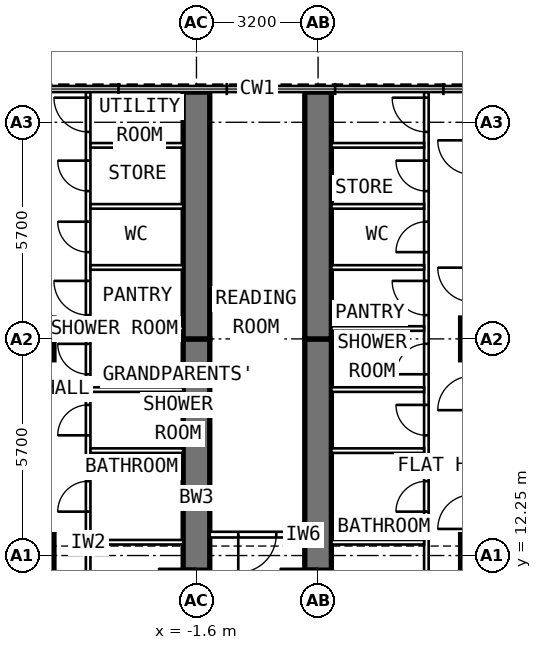
"""IFC4 building model, lengths in metres.
Left out: names, types, materials, properties, quantities, classifications, styles, units other than length and angle.
Written with IfcOpenShell. Run it as: python <this file> out.ifc"""

import sys

from ifc_helpers import new_model, si_unit, direction, frame, frame_2d, origin, origin_2d, place, context, subcontext, project, spatial, rectangle, extrude, element, fill, save


model = new_model("IFC4")
c1 = context("Model", 3, precision=1e-05, world=origin(), true_north=direction((0.0, 1.0)))
c2 = subcontext(c1, "Body", "Model", "MODEL_VIEW")
j1 = project(units=[si_unit("LENGTHUNIT", "METRE"), si_unit("PLANEANGLEUNIT", "RADIAN")], contexts=[c1])
p1 = place(None, origin())
s1 = spatial("IfcSite", under=j1, at=p1, CompositionType="ELEMENT")
p2 = place(p1, origin())
s2 = spatial("IfcBuilding", under=s1, at=p2, CompositionType="ELEMENT")
p3 = place(p2, frame((0.0, 0.0, 256.8)))
s3 = spatial("IfcBuildingStorey", under=s2, at=p3, CompositionType="ELEMENT", Elevation=256.8)
for number, where, z_axis, x_axis in (
    (1, (-5.9, 12.25, 0.0), (0.0, 0.0, 1.0), (0.0, 1.0, 0.0)),
    (2, (-5.9, 17.95, 0.0), (0.0, 0.0, 1.0), (0.0, 1.0, 0.0)),
    (3, (5.9, 12.25, 0.0), (0.0, 0.0, 1.0), (0.0, 1.0, 0.0)),
    (4, (5.9, 17.95, 0.0), (0.0, 0.0, 1.0), (0.0, 1.0, 0.0)),
):
    element("IfcColumn", number, at=place(p3, frame(where, z_axis=z_axis, x_axis=x_axis)), inside=s3, PredefinedType="COLUMN", context=c2, shape_type="SweptSolid", body=[
        extrude(rectangle(XDim=1.1, YDim=1.1, at=origin_2d()), origin(), (0.0, 0.0, 1.0), 3.6),
    ])
p4 = place(p3, frame((-1.6, 9.6, 0.0), z_axis=(0.0, 0.0, 1.0), x_axis=(0.0, 1.0, 0.0)))
e5 = element("IfcWall", 5, at=p4, inside=s3, PredefinedType="SHEAR", context=c2, shape_type="SweptSolid", body=[
    extrude(rectangle(XDim=8.35, YDim=0.7, at=frame_2d((4.175, 0.0))), origin(), (0.0, 0.0, 1.0), 3.6),
])
p5 = place(p4, frame((1.3, 0.0, 0.0)))
e6 = element("IfcOpeningElement", 6, at=p5, cuts=e5, PredefinedType="OPENING", context=c2, shape_type="SweptSolid", body=[
    extrude(rectangle(XDim=1.0, YDim=2.1, at=frame_2d((0.5, 1.05))), frame((0.0, 0.362, 0.0), z_axis=(0.0, -1.0, 0.0), x_axis=(1.0, 0.0, 0.0)), (0.0, 0.0, 1.0), 0.724),
])
p6 = place(p3, frame((-1.6, 17.95, 0.0), z_axis=(0.0, 0.0, 1.0), x_axis=(0.0, 1.0, 0.0)))
e7 = element("IfcWall", 7, at=p6, inside=s3, PredefinedType="SHEAR", context=c2, shape_type="SweptSolid", body=[
    extrude(rectangle(XDim=6.495, YDim=0.7, at=frame_2d((3.248, 0.0))), origin(), (0.0, 0.0, 1.0), 3.6),
])
p7 = place(p3, frame((1.6, 9.6, 0.0), z_axis=(0.0, 0.0, 1.0), x_axis=(0.0, 1.0, 0.0)))
e8 = element("IfcWall", 8, at=p7, inside=s3, PredefinedType="SHEAR", context=c2, shape_type="SweptSolid", body=[
    extrude(rectangle(XDim=8.35, YDim=0.7, at=frame_2d((4.175, 0.0))), origin(), (0.0, 0.0, 1.0), 3.6),
])
p8 = place(p7, frame((1.3, 0.0, 0.0)))
e9 = element("IfcOpeningElement", 9, at=p8, cuts=e8, PredefinedType="OPENING", context=c2, shape_type="SweptSolid", body=[
    extrude(rectangle(XDim=1.0, YDim=2.1, at=frame_2d((0.5, 1.05))), frame((0.0, 0.362, 0.0), z_axis=(0.0, -1.0, 0.0), x_axis=(1.0, 0.0, 0.0)), (0.0, 0.0, 1.0), 0.724),
])
p9 = place(p3, frame((1.6, 17.95, 0.0), z_axis=(0.0, 0.0, 1.0), x_axis=(0.0, 1.0, 0.0)))
e10 = element("IfcWall", 10, at=p9, inside=s3, PredefinedType="SHEAR", context=c2, shape_type="SweptSolid", body=[
    extrude(rectangle(XDim=6.495, YDim=0.7, at=frame_2d((3.248, 0.0))), origin(), (0.0, 0.0, 1.0), 3.6),
])
p10 = place(p3, frame((-4.45, 9.9, 0.0), z_axis=(0.0, 0.0, 1.0), x_axis=(0.0, 1.0, 0.0)))
e11 = element("IfcWall", 11, at=p10, inside=s3, PredefinedType="PARTITIONING", context=c2, shape_type="SweptSolid", body=[
    extrude(rectangle(XDim=14.545, YDim=0.12, at=frame_2d((7.272, 0.0))), origin(), (0.0, 0.0, 1.0), 3.3),
])
p11 = place(p10, frame((0.95, 0.0, 0.0)))
e12 = element("IfcOpeningElement", 12, at=p11, cuts=e11, PredefinedType="OPENING", context=c2, shape_type="SweptSolid", body=[
    extrude(rectangle(XDim=0.9, YDim=2.1, at=frame_2d((0.45, 1.05))), frame((0.0, 0.072, 0.0), z_axis=(0.0, -1.0, 0.0), x_axis=(1.0, 0.0, 0.0)), (0.0, 0.0, 1.0), 0.144),
])
p12 = place(p10, frame((3.505, 0.0, 0.0)))
e13 = element("IfcOpeningElement", 13, at=p12, cuts=e11, PredefinedType="OPENING", context=c2, shape_type="SweptSolid", body=[
    extrude(rectangle(XDim=0.8, YDim=2.1, at=frame_2d((0.4, 1.05))), frame((0.0, 0.072, 0.0), z_axis=(0.0, -1.0, 0.0), x_axis=(1.0, 0.0, 0.0)), (0.0, 0.0, 1.0), 0.144),
])
p13 = place(p10, frame((5.513, 0.0, 0.0)))
e14 = element("IfcOpeningElement", 14, at=p13, cuts=e11, PredefinedType="OPENING", context=c2, shape_type="SweptSolid", body=[
    extrude(rectangle(XDim=0.8, YDim=2.1, at=frame_2d((0.4, 1.05))), frame((0.0, 0.072, 0.0), z_axis=(0.0, -1.0, 0.0), x_axis=(1.0, 0.0, 0.0)), (0.0, 0.0, 1.0), 0.144),
])
p14 = place(p10, frame((7.12, 0.0, 0.0)))
e15 = element("IfcOpeningElement", 15, at=p14, cuts=e11, PredefinedType="OPENING", context=c2, shape_type="SweptSolid", body=[
    extrude(rectangle(XDim=0.8, YDim=2.1, at=frame_2d((0.4, 1.05))), frame((0.0, 0.072, 0.0), z_axis=(0.0, -1.0, 0.0), x_axis=(1.0, 0.0, 0.0)), (0.0, 0.0, 1.0), 0.144),
])
p15 = place(p10, frame((8.677, 0.0, 0.0)))
e16 = element("IfcOpeningElement", 16, at=p15, cuts=e11, PredefinedType="OPENING", context=c2, shape_type="SweptSolid", body=[
    extrude(rectangle(XDim=0.9, YDim=2.1, at=frame_2d((0.45, 1.05))), frame((0.0, 0.072, 0.0), z_axis=(0.0, -1.0, 0.0), x_axis=(1.0, 0.0, 0.0)), (0.0, 0.0, 1.0), 0.144),
])
p16 = place(p10, frame((10.333, 0.0, 0.0)))
e17 = element("IfcOpeningElement", 17, at=p16, cuts=e11, PredefinedType="OPENING", context=c2, shape_type="SweptSolid", body=[
    extrude(rectangle(XDim=0.8, YDim=2.1, at=frame_2d((0.4, 1.05))), frame((0.0, 0.072, 0.0), z_axis=(0.0, -1.0, 0.0), x_axis=(1.0, 0.0, 0.0)), (0.0, 0.0, 1.0), 0.144),
])
p17 = place(p10, frame((11.94, 0.0, 0.0)))
e18 = element("IfcOpeningElement", 18, at=p17, cuts=e11, PredefinedType="OPENING", context=c2, shape_type="SweptSolid", body=[
    extrude(rectangle(XDim=0.8, YDim=2.1, at=frame_2d((0.4, 1.05))), frame((0.0, 0.072, 0.0), z_axis=(0.0, -1.0, 0.0), x_axis=(1.0, 0.0, 0.0)), (0.0, 0.0, 1.0), 0.144),
])
p18 = place(p10, frame((13.497, 0.0, 0.0)))
e19 = element("IfcOpeningElement", 19, at=p18, cuts=e11, PredefinedType="OPENING", context=c2, shape_type="SweptSolid", body=[
    extrude(rectangle(XDim=0.9, YDim=2.1, at=frame_2d((0.45, 1.05))), frame((0.0, 0.072, 0.0), z_axis=(0.0, -1.0, 0.0), x_axis=(1.0, 0.0, 0.0)), (0.0, 0.0, 1.0), 0.144),
])
p19 = place(p3, frame((-1.95, 12.6, 0.0), z_axis=(0.0, 0.0, 1.0), x_axis=(-1.0, 0.0, 0.0)))
e20 = element("IfcWall", 20, at=p19, inside=s3, PredefinedType="PARTITIONING", context=c2, shape_type="SweptSolid", body=[
    extrude(rectangle(XDim=2.44, YDim=0.12, at=frame_2d((1.22, 0.0))), origin(), (0.0, 0.0, 1.0), 2.3),
])
for number, where, z_axis, x_axis in (
    (21, (-1.95, 15.01, 0.0), (0.0, 0.0, 1.0), (-1.0, 0.0, 0.0)),
    (22, (-1.95, 16.617, 0.0), (0.0, 0.0, 1.0), (-1.0, 0.0, 0.0)),
    (23, (-1.95, 18.223, 0.0), (0.0, 0.0, 1.0), (-1.0, 0.0, 0.0)),
    (24, (-1.95, 19.83, 0.0), (0.0, 0.0, 1.0), (-1.0, 0.0, 0.0)),
    (25, (-1.95, 21.437, 0.0), (0.0, 0.0, 1.0), (-1.0, 0.0, 0.0)),
    (26, (-1.95, 23.043, 0.0), (0.0, 0.0, 1.0), (-1.0, 0.0, 0.0)),
):
    element("IfcWall", number, at=place(p3, frame(where, z_axis=z_axis, x_axis=x_axis)), inside=s3, PredefinedType="PARTITIONING", context=c2, shape_type="SweptSolid", body=[
        extrude(rectangle(XDim=2.44, YDim=0.12, at=frame_2d((1.22, 0.0))), origin(), (0.0, 0.0, 1.0), 3.3),
    ])
p20 = place(p3, frame((4.45, 9.9, 0.0), z_axis=(0.0, 0.0, 1.0), x_axis=(0.0, 1.0, 0.0)))
e27 = element("IfcWall", 27, at=p20, inside=s3, PredefinedType="PARTITIONING", context=c2, shape_type="SweptSolid", body=[
    extrude(rectangle(XDim=14.545, YDim=0.12, at=frame_2d((7.272, 0.0))), origin(), (0.0, 0.0, 1.0), 3.3),
])
p21 = place(p20, frame((0.95, 0.0, 0.0)))
e28 = element("IfcOpeningElement", 28, at=p21, cuts=e27, PredefinedType="OPENING", context=c2, shape_type="SweptSolid", body=[
    extrude(rectangle(XDim=0.9, YDim=2.1, at=frame_2d((0.45, 1.05))), frame((0.0, 0.072, 0.0), z_axis=(0.0, -1.0, 0.0), x_axis=(1.0, 0.0, 0.0)), (0.0, 0.0, 1.0), 0.144),
])
p22 = place(p20, frame((3.505, 0.0, 0.0)))
e29 = element("IfcOpeningElement", 29, at=p22, cuts=e27, PredefinedType="OPENING", context=c2, shape_type="SweptSolid", body=[
    extrude(rectangle(XDim=0.8, YDim=2.1, at=frame_2d((0.4, 1.05))), frame((0.0, 0.072, 0.0), z_axis=(0.0, -1.0, 0.0), x_axis=(1.0, 0.0, 0.0)), (0.0, 0.0, 1.0), 0.144),
])
p23 = place(p20, frame((5.513, 0.0, 0.0)))
e30 = element("IfcOpeningElement", 30, at=p23, cuts=e27, PredefinedType="OPENING", context=c2, shape_type="SweptSolid", body=[
    extrude(rectangle(XDim=0.8, YDim=2.1, at=frame_2d((0.4, 1.05))), frame((0.0, 0.072, 0.0), z_axis=(0.0, -1.0, 0.0), x_axis=(1.0, 0.0, 0.0)), (0.0, 0.0, 1.0), 0.144),
])
p24 = place(p20, frame((7.12, 0.0, 0.0)))
e31 = element("IfcOpeningElement", 31, at=p24, cuts=e27, PredefinedType="OPENING", context=c2, shape_type="SweptSolid", body=[
    extrude(rectangle(XDim=0.8, YDim=2.1, at=frame_2d((0.4, 1.05))), frame((0.0, 0.072, 0.0), z_axis=(0.0, -1.0, 0.0), x_axis=(1.0, 0.0, 0.0)), (0.0, 0.0, 1.0), 0.144),
])
p25 = place(p20, frame((8.677, 0.0, 0.0)))
e32 = element("IfcOpeningElement", 32, at=p25, cuts=e27, PredefinedType="OPENING", context=c2, shape_type="SweptSolid", body=[
    extrude(rectangle(XDim=0.9, YDim=2.1, at=frame_2d((0.45, 1.05))), frame((0.0, 0.072, 0.0), z_axis=(0.0, -1.0, 0.0), x_axis=(1.0, 0.0, 0.0)), (0.0, 0.0, 1.0), 0.144),
])
p26 = place(p20, frame((10.333, 0.0, 0.0)))
e33 = element("IfcOpeningElement", 33, at=p26, cuts=e27, PredefinedType="OPENING", context=c2, shape_type="SweptSolid", body=[
    extrude(rectangle(XDim=0.8, YDim=2.1, at=frame_2d((0.4, 1.05))), frame((0.0, 0.072, 0.0), z_axis=(0.0, -1.0, 0.0), x_axis=(1.0, 0.0, 0.0)), (0.0, 0.0, 1.0), 0.144),
])
p27 = place(p20, frame((11.94, 0.0, 0.0)))
e34 = element("IfcOpeningElement", 34, at=p27, cuts=e27, PredefinedType="OPENING", context=c2, shape_type="SweptSolid", body=[
    extrude(rectangle(XDim=0.8, YDim=2.1, at=frame_2d((0.4, 1.05))), frame((0.0, 0.072, 0.0), z_axis=(0.0, -1.0, 0.0), x_axis=(1.0, 0.0, 0.0)), (0.0, 0.0, 1.0), 0.144),
])
p28 = place(p20, frame((13.497, 0.0, 0.0)))
e35 = element("IfcOpeningElement", 35, at=p28, cuts=e27, PredefinedType="OPENING", context=c2, shape_type="SweptSolid", body=[
    extrude(rectangle(XDim=0.9, YDim=2.1, at=frame_2d((0.45, 1.05))), frame((0.0, 0.072, 0.0), z_axis=(0.0, -1.0, 0.0), x_axis=(1.0, 0.0, 0.0)), (0.0, 0.0, 1.0), 0.144),
])
p29 = place(p3, frame((1.95, 12.6, 0.0), z_axis=(0.0, 0.0, 1.0), x_axis=(1.0, 0.0, 0.0)))
e36 = element("IfcWall", 36, at=p29, inside=s3, PredefinedType="PARTITIONING", context=c2, shape_type="SweptSolid", body=[
    extrude(rectangle(XDim=2.44, YDim=0.12, at=frame_2d((1.22, 0.0))), origin(), (0.0, 0.0, 1.0), 2.3),
])
for number, where, z_axis, x_axis in (
    (37, (1.95, 15.01, 0.0), (0.0, 0.0, 1.0), (1.0, 0.0, 0.0)),
    (38, (1.95, 16.617, 0.0), (0.0, 0.0, 1.0), (1.0, 0.0, 0.0)),
    (39, (1.95, 18.223, 0.0), (0.0, 0.0, 1.0), (1.0, 0.0, 0.0)),
    (40, (1.95, 19.83, 0.0), (0.0, 0.0, 1.0), (1.0, 0.0, 0.0)),
    (41, (1.95, 21.437, 0.0), (0.0, 0.0, 1.0), (1.0, 0.0, 0.0)),
    (42, (1.95, 23.043, 0.0), (0.0, 0.0, 1.0), (1.0, 0.0, 0.0)),
):
    element("IfcWall", number, at=place(p3, frame(where, z_axis=z_axis, x_axis=x_axis)), inside=s3, PredefinedType="PARTITIONING", context=c2, shape_type="SweptSolid", body=[
        extrude(rectangle(XDim=2.44, YDim=0.12, at=frame_2d((1.22, 0.0))), origin(), (0.0, 0.0, 1.0), 3.3),
    ])
p30 = place(p3, frame((1.25, 12.8, 0.0), z_axis=(0.0, 0.0, 1.0), x_axis=(-1.0, 0.0, 0.0)))
e43 = element("IfcWall", 43, at=p30, inside=s3, PredefinedType="PARTITIONING", context=c2, shape_type="SweptSolid", body=[
    extrude(rectangle(XDim=2.5, YDim=0.15, at=frame_2d((1.25, 0.0))), origin(), (0.0, 0.0, 1.0), 3.3),
])
p31 = place(p30, frame((0.75, 0.0, 0.0)))
e44 = element("IfcOpeningElement", 44, at=p31, cuts=e43, PredefinedType="OPENING", context=c2, shape_type="SweptSolid", body=[
    extrude(rectangle(XDim=1.0, YDim=2.1, at=frame_2d((0.5, 1.05))), frame((0.0, 0.087, 0.0), z_axis=(0.0, -1.0, 0.0), x_axis=(1.0, 0.0, 0.0)), (0.0, 0.0, 1.0), 0.174),
])
p32 = place(p5, origin())
e45 = element("IfcDoor", 45, at=p32, inside=s3, OperationType="SINGLE_SWING_RIGHT", PredefinedType="DOOR", context=c2, shape_type="SweptSolid", body=[
    extrude(rectangle(XDim=1.0, YDim=2.1, at=frame_2d((0.5, 1.05))), frame((0.0, 0.1, 0.0), z_axis=(0.0, -1.0, 0.0), x_axis=(1.0, 0.0, 0.0)), (0.0, 0.0, 1.0), 0.2),
])
fill(e6, e45)
p33 = place(p12, origin())
e46 = element("IfcDoor", 46, at=p33, inside=s3, OperationType="SINGLE_SWING_LEFT", PredefinedType="DOOR", context=c2, shape_type="SweptSolid", body=[
    extrude(rectangle(XDim=0.8, YDim=2.1, at=frame_2d((0.4, 1.05))), frame((0.0, 0.025, 0.0), z_axis=(0.0, -1.0, 0.0), x_axis=(1.0, 0.0, 0.0)), (0.0, 0.0, 1.0), 0.05),
])
fill(e13, e46)
p34 = place(p13, origin())
e47 = element("IfcDoor", 47, at=p34, inside=s3, OperationType="SINGLE_SWING_LEFT", PredefinedType="DOOR", context=c2, shape_type="SweptSolid", body=[
    extrude(rectangle(XDim=0.8, YDim=2.1, at=frame_2d((0.4, 1.05))), frame((0.0, 0.025, 0.0), z_axis=(0.0, -1.0, 0.0), x_axis=(1.0, 0.0, 0.0)), (0.0, 0.0, 1.0), 0.05),
])
fill(e14, e47)
p35 = place(p14, origin())
e48 = element("IfcDoor", 48, at=p35, inside=s3, OperationType="SINGLE_SWING_RIGHT", PredefinedType="DOOR", context=c2, shape_type="SweptSolid", body=[
    extrude(rectangle(XDim=0.8, YDim=2.1, at=frame_2d((0.4, 1.05))), frame((0.0, 0.025, 0.0), z_axis=(0.0, -1.0, 0.0), x_axis=(1.0, 0.0, 0.0)), (0.0, 0.0, 1.0), 0.05),
])
fill(e15, e48)
p36 = place(p15, origin())
e49 = element("IfcDoor", 49, at=p36, inside=s3, OperationType="SINGLE_SWING_RIGHT", PredefinedType="DOOR", context=c2, shape_type="SweptSolid", body=[
    extrude(rectangle(XDim=0.9, YDim=2.1, at=frame_2d((0.45, 1.05))), frame((0.0, 0.025, 0.0), z_axis=(0.0, -1.0, 0.0), x_axis=(1.0, 0.0, 0.0)), (0.0, 0.0, 1.0), 0.05),
])
fill(e16, e49)
p37 = place(p16, origin())
e50 = element("IfcDoor", 50, at=p37, inside=s3, OperationType="SINGLE_SWING_RIGHT", PredefinedType="DOOR", context=c2, shape_type="SweptSolid", body=[
    extrude(rectangle(XDim=0.8, YDim=2.1, at=frame_2d((0.4, 1.05))), frame((0.0, 0.025, 0.0), z_axis=(0.0, -1.0, 0.0), x_axis=(1.0, 0.0, 0.0)), (0.0, 0.0, 1.0), 0.05),
])
fill(e17, e50)
p38 = place(p17, origin())
e51 = element("IfcDoor", 51, at=p38, inside=s3, OperationType="SINGLE_SWING_RIGHT", PredefinedType="DOOR", context=c2, shape_type="SweptSolid", body=[
    extrude(rectangle(XDim=0.8, YDim=2.1, at=frame_2d((0.4, 1.05))), frame((0.0, 0.025, 0.0), z_axis=(0.0, -1.0, 0.0), x_axis=(1.0, 0.0, 0.0)), (0.0, 0.0, 1.0), 0.05),
])
fill(e18, e51)
p39 = place(p18, origin())
e52 = element("IfcDoor", 52, at=p39, inside=s3, OperationType="SINGLE_SWING_RIGHT", PredefinedType="DOOR", context=c2, shape_type="SweptSolid", body=[
    extrude(rectangle(XDim=0.9, YDim=2.1, at=frame_2d((0.45, 1.05))), frame((0.0, 0.025, 0.0), z_axis=(0.0, -1.0, 0.0), x_axis=(1.0, 0.0, 0.0)), (0.0, 0.0, 1.0), 0.05),
])
fill(e19, e52)
p40 = place(p8, origin())
e53 = element("IfcDoor", 53, at=p40, inside=s3, OperationType="SINGLE_SWING_RIGHT", PredefinedType="DOOR", context=c2, shape_type="SweptSolid", body=[
    extrude(rectangle(XDim=1.0, YDim=2.1, at=frame_2d((0.5, 1.05))), frame((0.0, 0.1, 0.0), z_axis=(0.0, -1.0, 0.0), x_axis=(1.0, 0.0, 0.0)), (0.0, 0.0, 1.0), 0.2),
])
fill(e9, e53)
p41 = place(p22, origin())
e54 = element("IfcDoor", 54, at=p41, inside=s3, OperationType="SINGLE_SWING_LEFT", PredefinedType="DOOR", context=c2, shape_type="SweptSolid", body=[
    extrude(rectangle(XDim=0.8, YDim=2.1, at=frame_2d((0.4, 1.05))), frame((0.0, 0.025, 0.0), z_axis=(0.0, -1.0, 0.0), x_axis=(1.0, 0.0, 0.0)), (0.0, 0.0, 1.0), 0.05),
])
fill(e29, e54)
p42 = place(p23, origin())
e55 = element("IfcDoor", 55, at=p42, inside=s3, OperationType="SINGLE_SWING_RIGHT", PredefinedType="DOOR", context=c2, shape_type="SweptSolid", body=[
    extrude(rectangle(XDim=0.8, YDim=2.1, at=frame_2d((0.4, 1.05))), frame((0.0, 0.025, 0.0), z_axis=(0.0, -1.0, 0.0), x_axis=(1.0, 0.0, 0.0)), (0.0, 0.0, 1.0), 0.05),
])
fill(e30, e55)
p43 = place(p24, origin())
e56 = element("IfcDoor", 56, at=p43, inside=s3, OperationType="SINGLE_SWING_LEFT", PredefinedType="DOOR", context=c2, shape_type="SweptSolid", body=[
    extrude(rectangle(XDim=0.8, YDim=2.1, at=frame_2d((0.4, 1.05))), frame((0.0, 0.025, 0.0), z_axis=(0.0, -1.0, 0.0), x_axis=(1.0, 0.0, 0.0)), (0.0, 0.0, 1.0), 0.05),
])
fill(e31, e56)
p44 = place(p25, origin())
e57 = element("IfcDoor", 57, at=p44, inside=s3, OperationType="SINGLE_SWING_RIGHT", PredefinedType="DOOR", context=c2, shape_type="SweptSolid", body=[
    extrude(rectangle(XDim=0.9, YDim=2.1, at=frame_2d((0.45, 1.05))), frame((0.0, 0.025, 0.0), z_axis=(0.0, -1.0, 0.0), x_axis=(1.0, 0.0, 0.0)), (0.0, 0.0, 1.0), 0.05),
])
fill(e32, e57)
p45 = place(p26, origin())
e58 = element("IfcDoor", 58, at=p45, inside=s3, OperationType="SINGLE_SWING_LEFT", PredefinedType="DOOR", context=c2, shape_type="SweptSolid", body=[
    extrude(rectangle(XDim=0.8, YDim=2.1, at=frame_2d((0.4, 1.05))), frame((0.0, 0.025, 0.0), z_axis=(0.0, -1.0, 0.0), x_axis=(1.0, 0.0, 0.0)), (0.0, 0.0, 1.0), 0.05),
])
fill(e33, e58)
p46 = place(p27, origin())
e59 = element("IfcDoor", 59, at=p46, inside=s3, OperationType="SINGLE_SWING_RIGHT", PredefinedType="DOOR", context=c2, shape_type="SweptSolid", body=[
    extrude(rectangle(XDim=0.8, YDim=2.1, at=frame_2d((0.4, 1.05))), frame((0.0, 0.025, 0.0), z_axis=(0.0, -1.0, 0.0), x_axis=(1.0, 0.0, 0.0)), (0.0, 0.0, 1.0), 0.05),
])
fill(e34, e59)
p47 = place(p28, origin())
e60 = element("IfcDoor", 60, at=p47, inside=s3, OperationType="SINGLE_SWING_RIGHT", PredefinedType="DOOR", context=c2, shape_type="SweptSolid", body=[
    extrude(rectangle(XDim=0.9, YDim=2.1, at=frame_2d((0.45, 1.05))), frame((0.0, 0.025, 0.0), z_axis=(0.0, -1.0, 0.0), x_axis=(1.0, 0.0, 0.0)), (0.0, 0.0, 1.0), 0.05),
])
fill(e35, e60)
p48 = place(p31, origin())
e61 = element("IfcDoor", 61, at=p48, inside=s3, OperationType="SINGLE_SWING_RIGHT", PredefinedType="DOOR", context=c2, shape_type="SweptSolid", body=[
    extrude(rectangle(XDim=1.0, YDim=2.1, at=frame_2d((0.5, 1.05))), frame((0.0, 0.025, 0.0), z_axis=(0.0, -1.0, 0.0), x_axis=(1.0, 0.0, 0.0)), (0.0, 0.0, 1.0), 0.05),
])
fill(e44, e61)
save(model, sys.argv[1])
